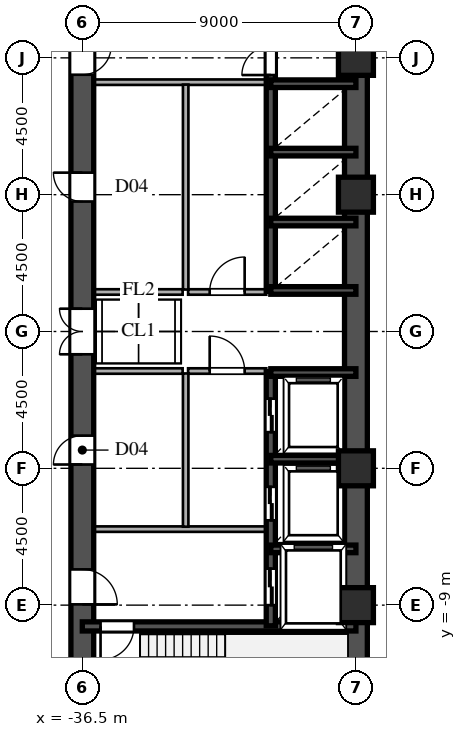
"""IFC4 building model, lengths in metres.
Left out: names, types, materials, properties, quantities, classifications, styles, units other than length and angle.
Written with IfcOpenShell. Run it as: python <this file> out.ifc"""

import sys

from ifc_helpers import new_model, si_unit, direction, frame, frame_2d, origin, origin_2d, place, context, subcontext, project, spatial, rectangle, hollow_rectangle, extrude, source, transform, mapped, element, fill, save


model = new_model("IFC4")
c1 = context("Model", 3, precision=1e-05, world=origin(), true_north=direction((0.0, 1.0)))
c2 = subcontext(c1, "Body", "Model", "MODEL_VIEW")
j1 = project(units=[si_unit("LENGTHUNIT", "METRE"), si_unit("PLANEANGLEUNIT", "RADIAN")], contexts=[c1])
p1 = place(None, origin())
s1 = spatial("IfcSite", under=j1, at=p1, CompositionType="ELEMENT")
p2 = place(p1, origin())
s2 = spatial("IfcBuilding", under=s1, at=p2, CompositionType="ELEMENT")
p3 = place(p2, frame((0.0, 0.0, 18.9)))
s3 = spatial("IfcBuildingStorey", under=s2, at=p3, CompositionType="ELEMENT", Elevation=18.9)
m1 = source(origin(), c2, "Body", "SweptSolid", [
    extrude(hollow_rectangle(XDim=1.15, YDim=1.15, WallThickness=0.048, at=origin_2d()), origin(), (0.0, 0.0, 1.0), 3.6),
])
for number, where, z_axis, x_axis in (
    (1, (-27.5, -9.0, 0.0), (0.0, 0.0, 1.0), (1.0, 0.0, 0.0)),
    (2, (-27.5, -4.5, 0.0), (0.0, 0.0, 1.0), (1.0, 0.0, 0.0)),
    (3, (-27.5, 4.5, 0.0), (0.0, 0.0, 1.0), (1.0, 0.0, 0.0)),
    (4, (-27.5, 9.0, 0.0), (0.0, 0.0, 1.0), (1.0, 0.0, 0.0)),
):
    element("IfcColumn", number, at=place(p3, frame(where, z_axis=z_axis, x_axis=x_axis)), inside=s3, PredefinedType="COLUMN", context=c2, shape_type="MappedRepresentation", body=[
        mapped(m1, transform((0.0, 0.0, 0.0), scale=1.0)),
    ])
for number, where, z_axis, x_axis in (
    (5, (-27.5, -13.5, 0.0), (0.0, 0.0, 1.0), (0.0, 1.0, 0.0)),
    (6, (-27.5, 1.3, 0.0), (0.0, 0.0, 1.0), (0.0, 1.0, 0.0)),
):
    element("IfcWall", number, at=place(p3, frame(where, z_axis=z_axis, x_axis=x_axis)), inside=s3, PredefinedType="SHEAR", context=c2, shape_type="SweptSolid", body=[
        extrude(rectangle(XDim=12.2, YDim=0.75, at=frame_2d((6.1, 0.0))), origin(), (0.0, 0.0, 1.0), 3.38),
    ])
p4 = place(p3, frame((-27.5, -1.3, 0.0), z_axis=(0.0, 0.0, 1.0), x_axis=(0.0, 1.0, 0.0)))
e7 = element("IfcWall", 7, at=p4, inside=s3, PredefinedType="SHEAR", context=c2, shape_type="SweptSolid", body=[
    extrude(rectangle(XDim=2.6, YDim=0.75, at=frame_2d((1.3, 0.0))), origin(), (0.0, 0.0, 1.0), 3.38),
])
p5 = place(p3, frame((-36.5, -13.65, 0.0), z_axis=(0.0, 0.0, 1.0), x_axis=(0.0, 1.0, 0.0)))
e8 = element("IfcWall", 8, at=p5, inside=s3, PredefinedType="SHEAR", context=c2, shape_type="SweptSolid", body=[
    extrude(rectangle(XDim=7.15, YDim=0.75, at=frame_2d((3.575, 0.0))), origin(), (0.0, 0.0, 1.0), 3.38),
])
p6 = place(p5, frame((4.675, 0.0, 0.0)))
e9 = element("IfcOpeningElement", 9, at=p6, cuts=e8, PredefinedType="OPENING", context=c2, shape_type="SweptSolid", body=[
    extrude(rectangle(XDim=1.15, YDim=2.2, at=frame_2d((0.575, 1.1))), frame((0.0, 0.385, 0.0), z_axis=(0.0, -1.0, 0.0), x_axis=(1.0, 0.0, 0.0)), (0.0, 0.0, 1.0), 0.77),
])
p7 = place(p3, frame((-36.5, -1.3, 0.0), z_axis=(0.0, 0.0, 1.0), x_axis=(0.0, 1.0, 0.0)))
e10 = element("IfcWall", 10, at=p7, inside=s3, PredefinedType="SHEAR", context=c2, shape_type="SweptSolid", body=[
    extrude(rectangle(XDim=2.6, YDim=0.75, at=frame_2d((1.3, 0.0))), origin(), (0.0, 0.0, 1.0), 3.38),
])
p8 = place(p7, frame((0.55, 0.0, 0.0)))
e11 = element("IfcOpeningElement", 11, at=p8, cuts=e10, PredefinedType="OPENING", context=c2, shape_type="SweptSolid", body=[
    extrude(rectangle(XDim=1.5, YDim=2.3, at=frame_2d((0.75, 1.15))), frame((0.0, 0.385, 0.0), z_axis=(0.0, -1.0, 0.0), x_axis=(1.0, 0.0, 0.0)), (0.0, 0.0, 1.0), 0.77),
])
p9 = place(p3, frame((-36.5, 8.2, 0.0), z_axis=(0.0, 0.0, 1.0), x_axis=(0.0, 1.0, 0.0)))
e12 = element("IfcWall", 12, at=p9, inside=s3, PredefinedType="SHEAR", context=c2, shape_type="SweptSolid", body=[
    extrude(rectangle(XDim=5.45, YDim=0.75, at=frame_2d((2.725, 0.0))), origin(), (0.0, 0.0, 1.0), 3.38),
])
p10 = place(p9, frame((0.245, 0.0, 0.0)))
e13 = element("IfcOpeningElement", 13, at=p10, cuts=e12, PredefinedType="OPENING", context=c2, shape_type="SweptSolid", body=[
    extrude(rectangle(XDim=0.95, YDim=2.15, at=frame_2d((0.475, 1.075))), frame((0.0, 0.385, 0.0), z_axis=(0.0, -1.0, 0.0), x_axis=(1.0, 0.0, 0.0)), (0.0, 0.0, 1.0), 0.77),
])
p11 = place(p3, frame((-36.5, -6.5, 0.0), z_axis=(0.0, 0.0, 1.0), x_axis=(0.0, 1.0, 0.0)))
e14 = element("IfcWall", 14, at=p11, inside=s3, PredefinedType="SHEAR", context=c2, shape_type="SweptSolid", body=[
    extrude(rectangle(XDim=5.2, YDim=0.75, at=frame_2d((2.6, 0.0))), origin(), (0.0, 0.0, 1.0), 3.38),
])
p12 = place(p11, frame((2.125, 0.0, 0.0)))
e15 = element("IfcOpeningElement", 15, at=p12, cuts=e14, PredefinedType="OPENING", context=c2, shape_type="SweptSolid", body=[
    extrude(rectangle(XDim=0.95, YDim=2.15, at=frame_2d((0.475, 1.075))), frame((0.0, 0.385, 0.0), z_axis=(0.0, -1.0, 0.0), x_axis=(1.0, 0.0, 0.0)), (0.0, 0.0, 1.0), 0.77),
])
p13 = place(p3, frame((-36.5, 1.3, 0.0), z_axis=(0.0, 0.0, 1.0), x_axis=(0.0, 1.0, 0.0)))
e16 = element("IfcWall", 16, at=p13, inside=s3, PredefinedType="SHEAR", context=c2, shape_type="SweptSolid", body=[
    extrude(rectangle(XDim=6.9, YDim=0.75, at=frame_2d((3.45, 0.0))), origin(), (0.0, 0.0, 1.0), 3.38),
])
p14 = place(p13, frame((2.975, 0.0, 0.0)))
e17 = element("IfcOpeningElement", 17, at=p14, cuts=e16, PredefinedType="OPENING", context=c2, shape_type="SweptSolid", body=[
    extrude(rectangle(XDim=0.95, YDim=2.15, at=frame_2d((0.475, 1.075))), frame((0.0, 0.385, 0.0), z_axis=(0.0, -1.0, 0.0), x_axis=(1.0, 0.0, 0.0)), (0.0, 0.0, 1.0), 0.77),
])
p15 = place(p3, frame((-36.5, -9.7, 0.0), z_axis=(0.0, 0.0, 1.0), x_axis=(1.0, 0.0, 0.0)))
e18 = element("IfcWall", 18, at=p15, inside=s3, PredefinedType="SHEAR", context=c2, shape_type="SweptSolid", body=[
    extrude(rectangle(XDim=9.0, YDim=0.3, at=frame_2d((4.5, 0.0))), origin(), (0.0, 0.0, 1.0), 3.38),
])
p16 = place(p15, frame((0.6, 0.0, 0.0)))
e19 = element("IfcOpeningElement", 19, at=p16, cuts=e18, PredefinedType="OPENING", context=c2, shape_type="SweptSolid", body=[
    extrude(rectangle(XDim=1.1, YDim=2.2, at=frame_2d((0.55, 1.1))), frame((0.0, 0.16, 0.0), z_axis=(0.0, -1.0, 0.0), x_axis=(1.0, 0.0, 0.0)), (0.0, 0.0, 1.0), 0.32),
])
for number, where, z_axis, x_axis in (
    (20, (-30.3, -7.15, 0.0), (0.0, 0.0, 1.0), (1.0, 0.0, 0.0)),
    (21, (-30.3, -4.2, 0.0), (0.0, 0.0, 1.0), (1.0, 0.0, 0.0)),
    (22, (-30.3, -1.35, 0.0), (0.0, 0.0, 1.0), (1.0, 0.0, 0.0)),
    (23, (-30.3, 1.35, 0.0), (0.0, 0.0, 1.0), (1.0, 0.0, 0.0)),
    (24, (-30.3, 3.6, 0.0), (0.0, 0.0, 1.0), (1.0, 0.0, 0.0)),
    (25, (-30.3, 5.9, 0.0), (0.0, 0.0, 1.0), (1.0, 0.0, 0.0)),
    (26, (-30.3, 8.15, 0.0), (0.0, 0.0, 1.0), (1.0, 0.0, 0.0)),
):
    element("IfcWall", number, at=place(p3, frame(where, z_axis=z_axis, x_axis=x_axis)), inside=s3, PredefinedType="SHEAR", context=c2, shape_type="SweptSolid", body=[
        extrude(rectangle(XDim=2.8, YDim=0.25, at=frame_2d((1.4, 0.0))), origin(), (0.0, 0.0, 1.0), 3.38),
    ])
p17 = place(p3, frame((-30.3, -9.68, 0.0), z_axis=(0.0, 0.0, 1.0), x_axis=(0.0, 1.0, 0.0)))
e27 = element("IfcWall", 27, at=p17, inside=s3, PredefinedType="SHEAR", context=c2, shape_type="SweptSolid", body=[
    extrude(rectangle(XDim=2.56, YDim=0.3, at=frame_2d((1.28, 0.0))), origin(), (0.0, 0.0, 1.0), 3.38),
])
p18 = place(p17, frame((0.68, 0.0, 0.0)))
e28 = element("IfcOpeningElement", 28, at=p18, cuts=e27, PredefinedType="OPENING", context=c2, shape_type="SweptSolid", body=[
    extrude(rectangle(XDim=1.2, YDim=2.25, at=frame_2d((0.6, 1.125))), frame((0.0, 0.16, 0.0), z_axis=(0.0, -1.0, 0.0), x_axis=(1.0, 0.0, 0.0)), (0.0, 0.0, 1.0), 0.32),
])
p19 = place(p3, frame((-30.3, -7.12, 0.0), z_axis=(0.0, 0.0, 1.0), x_axis=(0.0, 1.0, 0.0)))
e29 = element("IfcWall", 29, at=p19, inside=s3, PredefinedType="SHEAR", context=c2, shape_type="SweptSolid", body=[
    extrude(rectangle(XDim=2.92, YDim=0.3, at=frame_2d((1.46, 0.0))), origin(), (0.0, 0.0, 1.0), 3.38),
])
p20 = place(p19, frame((0.91, 0.0, 0.0)))
e30 = element("IfcOpeningElement", 30, at=p20, cuts=e29, PredefinedType="OPENING", context=c2, shape_type="SweptSolid", body=[
    extrude(rectangle(XDim=1.1, YDim=2.2, at=frame_2d((0.55, 1.1))), frame((0.0, 0.16, 0.0), z_axis=(0.0, -1.0, 0.0), x_axis=(1.0, 0.0, 0.0)), (0.0, 0.0, 1.0), 0.32),
])
p21 = place(p3, frame((-30.3, -4.2, 0.0), z_axis=(0.0, 0.0, 1.0), x_axis=(0.0, 1.0, 0.0)))
e31 = element("IfcWall", 31, at=p21, inside=s3, PredefinedType="SHEAR", context=c2, shape_type="SweptSolid", body=[
    extrude(rectangle(XDim=2.88, YDim=0.3, at=frame_2d((1.44, 0.0))), origin(), (0.0, 0.0, 1.0), 3.38),
])
p22 = place(p21, frame((0.89, 0.0, 0.0)))
e32 = element("IfcOpeningElement", 32, at=p22, cuts=e31, PredefinedType="OPENING", context=c2, shape_type="SweptSolid", body=[
    extrude(rectangle(XDim=1.1, YDim=2.2, at=frame_2d((0.55, 1.1))), frame((0.0, 0.16, 0.0), z_axis=(0.0, -1.0, 0.0), x_axis=(1.0, 0.0, 0.0)), (0.0, 0.0, 1.0), 0.32),
])
p23 = place(p3, frame((-30.3, 1.32, 0.0), z_axis=(0.0, 0.0, 1.0), x_axis=(0.0, 1.0, 0.0)))
e33 = element("IfcWall", 33, at=p23, inside=s3, PredefinedType="SHEAR", context=c2, shape_type="SweptSolid", body=[
    extrude(rectangle(XDim=2.28, YDim=0.3, at=frame_2d((1.14, 0.0))), origin(), (0.0, 0.0, 1.0), 3.38),
])
p24 = place(p3, frame((-30.3, 3.6, 0.0), z_axis=(0.0, 0.0, 1.0), x_axis=(0.0, 1.0, 0.0)))
e34 = element("IfcWall", 34, at=p24, inside=s3, PredefinedType="SHEAR", context=c2, shape_type="SweptSolid", body=[
    extrude(rectangle(XDim=2.3, YDim=0.3, at=frame_2d((1.15, 0.0))), origin(), (0.0, 0.0, 1.0), 3.38),
])
p25 = place(p3, frame((-30.3, 5.9, 0.0), z_axis=(0.0, 0.0, 1.0), x_axis=(0.0, 1.0, 0.0)))
e35 = element("IfcWall", 35, at=p25, inside=s3, PredefinedType="SHEAR", context=c2, shape_type="SweptSolid", body=[
    extrude(rectangle(XDim=2.25, YDim=0.3, at=frame_2d((1.125, 0.0))), origin(), (0.0, 0.0, 1.0), 3.38),
])
p26 = place(p3, frame((-30.3, 8.15, 0.0), z_axis=(0.0, 0.0, 1.0), x_axis=(0.0, 1.0, 0.0)))
e36 = element("IfcWall", 36, at=p26, inside=s3, PredefinedType="SHEAR", context=c2, shape_type="SweptSolid", body=[
    extrude(rectangle(XDim=1.53, YDim=0.3, at=frame_2d((0.765, 0.0))), origin(), (0.0, 0.0, 1.0), 3.38),
])
p27 = place(p26, frame((0.285, 0.0, 0.0)))
e37 = element("IfcOpeningElement", 37, at=p27, cuts=e36, PredefinedType="OPENING", context=c2, shape_type="SweptSolid", body=[
    extrude(rectangle(XDim=0.95, YDim=2.15, at=frame_2d((0.475, 1.075))), frame((0.0, 0.16, 0.0), z_axis=(0.0, -1.0, 0.0), x_axis=(1.0, 0.0, 0.0)), (0.0, 0.0, 1.0), 0.32),
])
for number, where, z_axis, x_axis in (
    (38, (-36.15, -6.5, 0.0), (0.0, 0.0, 1.0), (1.0, 0.0, 0.0)),
    (39, (-36.15, 8.2, 0.0), (0.0, 0.0, 1.0), (1.0, 0.0, 0.0)),
):
    element("IfcWall", number, at=place(p3, frame(where, z_axis=z_axis, x_axis=x_axis)), inside=s3, PredefinedType="PARTITIONING", context=c2, shape_type="SweptSolid", body=[
        extrude(rectangle(XDim=5.7, YDim=0.18, at=frame_2d((2.85, 0.0))), origin(), (0.0, 0.0, 1.0), 3.38),
    ])
p28 = place(p3, frame((-33.1, -6.42, 0.0), z_axis=(0.0, 0.0, 1.0), x_axis=(0.0, 1.0, 0.0)))
e40 = element("IfcWall", 40, at=p28, inside=s3, PredefinedType="PARTITIONING", context=c2, shape_type="SweptSolid", body=[
    extrude(rectangle(XDim=5.04, YDim=0.18, at=frame_2d((2.52, 0.0))), origin(), (0.0, 0.0, 1.0), 3.38),
])
p29 = place(p3, frame((-33.1, 1.38, 0.0), z_axis=(0.0, 0.0, 1.0), x_axis=(0.0, 1.0, 0.0)))
e41 = element("IfcWall", 41, at=p29, inside=s3, PredefinedType="PARTITIONING", context=c2, shape_type="SweptSolid", body=[
    extrude(rectangle(XDim=6.74, YDim=0.18, at=frame_2d((3.37, 0.0))), origin(), (0.0, 0.0, 1.0), 3.38),
])
p30 = place(p3, frame((-33.02, -1.3, 0.0), z_axis=(0.0, 0.0, 1.0), x_axis=(1.0, 0.0, 0.0)))
e42 = element("IfcWall", 42, at=p30, inside=s3, PredefinedType="PARTITIONING", context=c2, shape_type="SweptSolid", body=[
    extrude(rectangle(XDim=2.57, YDim=0.18, at=frame_2d((1.285, 0.0))), origin(), (0.0, 0.0, 1.0), 3.38),
])
p31 = place(p30, frame((0.71, 0.0, 0.0)))
e43 = element("IfcOpeningElement", 43, at=p31, cuts=e42, PredefinedType="OPENING", context=c2, shape_type="SweptSolid", body=[
    extrude(rectangle(XDim=1.15, YDim=2.2, at=frame_2d((0.575, 1.1))), frame((0.0, 0.1, 0.0), z_axis=(0.0, -1.0, 0.0), x_axis=(1.0, 0.0, 0.0)), (0.0, 0.0, 1.0), 0.2),
])
p32 = place(p3, frame((-33.02, 1.3, 0.0), z_axis=(0.0, 0.0, 1.0), x_axis=(1.0, 0.0, 0.0)))
e44 = element("IfcWall", 44, at=p32, inside=s3, PredefinedType="PARTITIONING", context=c2, shape_type="SweptSolid", body=[
    extrude(rectangle(XDim=2.57, YDim=0.18, at=frame_2d((1.285, 0.0))), origin(), (0.0, 0.0, 1.0), 3.38),
])
p33 = place(p32, frame((0.71, 0.0, 0.0)))
e45 = element("IfcOpeningElement", 45, at=p33, cuts=e44, PredefinedType="OPENING", context=c2, shape_type="SweptSolid", body=[
    extrude(rectangle(XDim=1.15, YDim=2.2, at=frame_2d((0.575, 1.1))), frame((0.0, 0.1, 0.0), z_axis=(0.0, -1.0, 0.0), x_axis=(1.0, 0.0, 0.0)), (0.0, 0.0, 1.0), 0.2),
])
for number, where, z_axis, x_axis in (
    (46, (-36.15, -1.3, 0.0), (0.0, 0.0, 1.0), (1.0, 0.0, 0.0)),
    (47, (-36.15, 1.3, 0.0), (0.0, 0.0, 1.0), (1.0, 0.0, 0.0)),
):
    element("IfcWall", number, at=place(p3, frame(where, z_axis=z_axis, x_axis=x_axis)), inside=s3, PredefinedType="PARTITIONING", context=c2, shape_type="SweptSolid", body=[
        extrude(rectangle(XDim=2.95, YDim=0.18, at=frame_2d((1.475, 0.0))), origin(), (0.0, 0.0, 1.0), 3.38),
    ])
m2 = source(origin(), c2, "Body", "SweptSolid", [
    extrude(rectangle(XDim=1.15, YDim=2.2, at=frame_2d((0.575, 1.1))), frame((0.0, 0.025, 0.0), z_axis=(0.0, -1.0, 0.0), x_axis=(1.0, 0.0, 0.0)), (0.0, 0.0, 1.0), 0.05),
])
p34 = place(p6, frame((1.15, 0.0, 0.0), z_axis=(0.0, 0.0, 1.0), x_axis=(-1.0, 0.0, 0.0)))
e48 = element("IfcDoor", 48, at=p34, inside=s3, OperationType="SINGLE_SWING_LEFT", PredefinedType="DOOR", context=c2, shape_type="MappedRepresentation", body=[
    mapped(m2, transform((0.0, 0.0, 0.0), scale=1.0)),
])
fill(e9, e48)
m3 = source(origin(), c2, "Body", "SweptSolid", [
    extrude(rectangle(XDim=1.5, YDim=2.3, at=frame_2d((0.75, 1.15))), frame((0.0, 0.025, 0.0), z_axis=(0.0, -1.0, 0.0), x_axis=(1.0, 0.0, 0.0)), (0.0, 0.0, 1.0), 0.05),
])
p35 = place(p8, origin())
e49 = element("IfcDoor", 49, at=p35, inside=s3, OperationType="DOUBLE_SWING_LEFT", PredefinedType="DOOR", context=c2, shape_type="MappedRepresentation", body=[
    mapped(m3, transform((0.0, 0.0, 0.0), scale=1.0)),
])
fill(e11, e49)
m4 = source(origin(), c2, "Body", "SweptSolid", [
    extrude(rectangle(XDim=0.95, YDim=2.15, at=frame_2d((0.475, 1.075))), frame((0.0, 0.025, 0.0), z_axis=(0.0, -1.0, 0.0), x_axis=(1.0, 0.0, 0.0)), (0.0, 0.0, 1.0), 0.05),
])
p36 = place(p10, frame((0.95, 0.0, 0.0), z_axis=(0.0, 0.0, 1.0), x_axis=(-1.0, 0.0, 0.0)))
e50 = element("IfcDoor", 50, at=p36, inside=s3, OperationType="SINGLE_SWING_RIGHT", PredefinedType="DOOR", context=c2, shape_type="MappedRepresentation", body=[
    mapped(m4, transform((0.0, 0.0, 0.0), scale=1.0)),
])
fill(e13, e50)
p37 = place(p12, origin())
e51 = element("IfcDoor", 51, at=p37, inside=s3, OperationType="SINGLE_SWING_LEFT", PredefinedType="DOOR", context=c2, shape_type="MappedRepresentation", body=[
    mapped(m4, transform((0.0, 0.0, 0.0), scale=1.0)),
])
fill(e15, e51)
p38 = place(p14, origin())
e52 = element("IfcDoor", 52, at=p38, inside=s3, OperationType="SINGLE_SWING_RIGHT", PredefinedType="DOOR", context=c2, shape_type="MappedRepresentation", body=[
    mapped(m4, transform((0.0, 0.0, 0.0), scale=1.0)),
])
fill(e17, e52)
m5 = source(origin(), c2, "Body", "SweptSolid", [
    extrude(rectangle(XDim=1.1, YDim=2.2, at=frame_2d((0.55, 1.1))), frame((0.0, 0.025, 0.0), z_axis=(0.0, -1.0, 0.0), x_axis=(1.0, 0.0, 0.0)), (0.0, 0.0, 1.0), 0.05),
])
p39 = place(p16, frame((1.1, 0.0, 0.0), z_axis=(0.0, 0.0, 1.0), x_axis=(-1.0, 0.0, 0.0)))
e53 = element("IfcDoor", 53, at=p39, inside=s3, OperationType="SINGLE_SWING_LEFT", PredefinedType="DOOR", context=c2, shape_type="MappedRepresentation", body=[
    mapped(m5, transform((0.0, 0.0, 0.0), scale=1.0)),
])
fill(e19, e53)
m6 = source(origin(), c2, "Body", "SweptSolid", [
    extrude(rectangle(XDim=1.2, YDim=2.25, at=frame_2d((0.6, 1.125))), frame((0.0, 0.025, 0.0), z_axis=(0.0, -1.0, 0.0), x_axis=(1.0, 0.0, 0.0)), (0.0, 0.0, 1.0), 0.05),
])
p40 = place(p18, origin())
e54 = element("IfcDoor", 54, at=p40, inside=s3, OperationType="DOUBLE_DOOR_SLIDING", PredefinedType="DOOR", context=c2, shape_type="MappedRepresentation", body=[
    mapped(m6, transform((0.0, 0.0, 0.0), scale=1.0)),
])
fill(e28, e54)
m7 = source(origin(), c2, "Body", "SweptSolid", [
    extrude(rectangle(XDim=1.1, YDim=2.2, at=frame_2d((0.55, 1.1))), frame((0.0, 0.025, 0.0), z_axis=(0.0, -1.0, 0.0), x_axis=(1.0, 0.0, 0.0)), (0.0, 0.0, 1.0), 0.05),
])
p41 = place(p20, origin())
e55 = element("IfcDoor", 55, at=p41, inside=s3, OperationType="DOUBLE_DOOR_SLIDING", PredefinedType="DOOR", context=c2, shape_type="MappedRepresentation", body=[
    mapped(m7, transform((0.0, 0.0, 0.0), scale=1.0)),
])
fill(e30, e55)
p42 = place(p22, origin())
e56 = element("IfcDoor", 56, at=p42, inside=s3, OperationType="DOUBLE_DOOR_SLIDING", PredefinedType="DOOR", context=c2, shape_type="MappedRepresentation", body=[
    mapped(m7, transform((0.0, 0.0, 0.0), scale=1.0)),
])
fill(e32, e56)
p43 = place(p27, origin())
e57 = element("IfcDoor", 57, at=p43, inside=s3, OperationType="SINGLE_SWING_LEFT", PredefinedType="DOOR", context=c2, shape_type="MappedRepresentation", body=[
    mapped(m4, transform((0.0, 0.0, 0.0), scale=1.0)),
])
fill(e37, e57)
p44 = place(p31, origin())
e58 = element("IfcDoor", 58, at=p44, inside=s3, OperationType="SINGLE_SWING_LEFT", PredefinedType="DOOR", context=c2, shape_type="MappedRepresentation", body=[
    mapped(m2, transform((0.0, 0.0, 0.0), scale=1.0)),
])
fill(e43, e58)
p45 = place(p33, origin())
e59 = element("IfcDoor", 59, at=p45, inside=s3, OperationType="SINGLE_SWING_RIGHT", PredefinedType="DOOR", context=c2, shape_type="MappedRepresentation", body=[
    mapped(m2, transform((0.0, 0.0, 0.0), scale=1.0)),
])
fill(e45, e59)
save(model, sys.argv[1])
